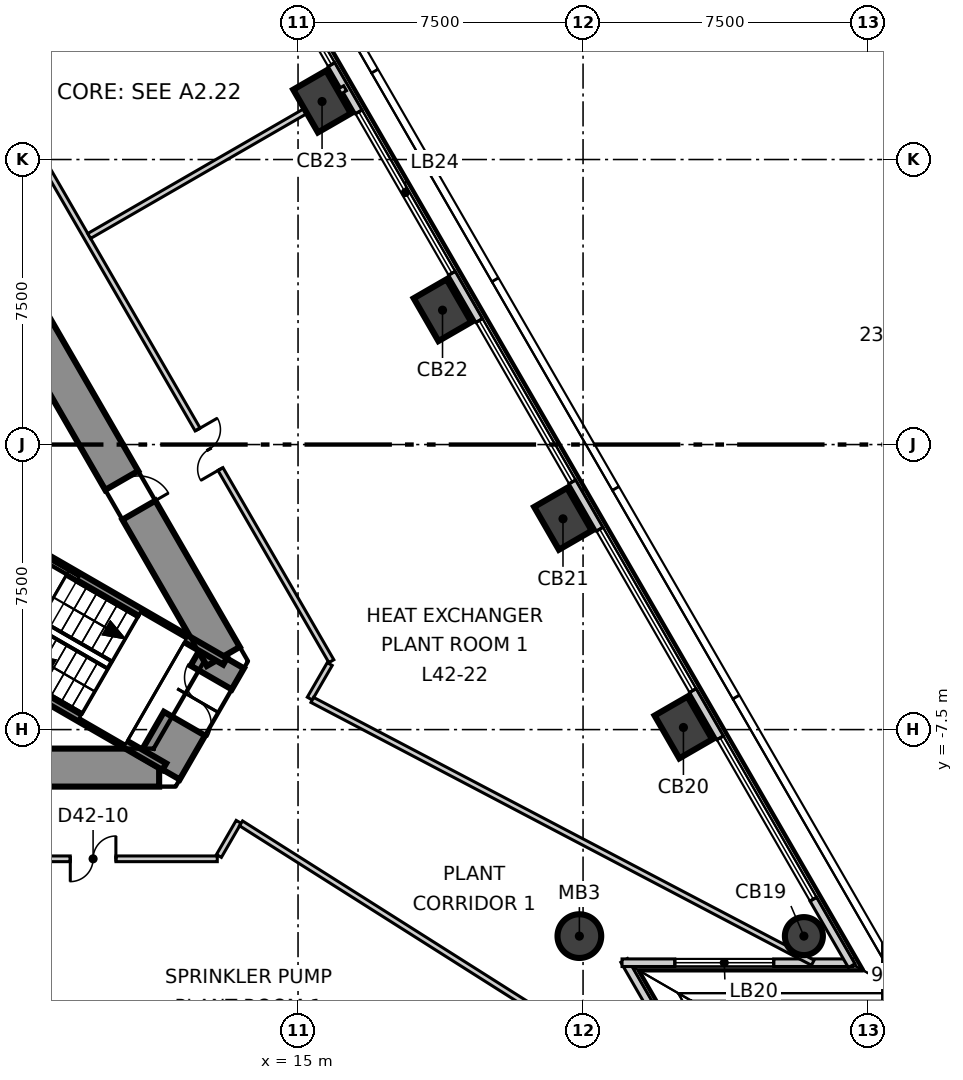
"""IFC4 building model, lengths in metres.
Left out: names, types, materials, properties, quantities, classifications, styles, units other than length and angle.
Written with IfcOpenShell. Run it as: python <this file> out.ifc"""

import sys

from ifc_helpers import new_model, si_unit, direction, frame, frame_2d, origin, origin_2d, place, context, subcontext, project, spatial, polyline, rectangle, circle, outline, extrude, element, fill, save


model = new_model("IFC4")
c1 = context("Model", 3, precision=1e-05, world=origin(), true_north=direction((0.0, 1.0)))
c2 = subcontext(c1, "Body", "Model", "MODEL_VIEW")
j1 = project(units=[si_unit("LENGTHUNIT", "METRE"), si_unit("PLANEANGLEUNIT", "RADIAN")], contexts=[c1])
p1 = place(None, origin())
s1 = spatial("IfcSite", under=j1, at=p1, CompositionType="ELEMENT")
p2 = place(p1, origin())
s2 = spatial("IfcBuilding", under=s1, at=p2, CompositionType="ELEMENT")
p3 = place(p2, frame((0.0, 0.0, 180.8)))
s3 = spatial("IfcBuildingStorey", under=s2, at=p3, CompositionType="ELEMENT", Elevation=180.8)
p4 = place(p3, frame((-11.345, -8.5, -0.6), z_axis=(0.0, 0.0, 1.0), x_axis=(1.0, 0.0, 0.0)))
e1 = element("IfcWall", 1, at=p4, inside=s3, PredefinedType="SHEAR", context=c2, shape_type="SweptSolid", body=[
    extrude(outline(polyline([(-0.433, -0.5), (1.53, -0.5), (3.493, -0.5), (5.456, -0.5), (7.419, -0.5), (9.382, -0.5), (11.345, -0.5), (13.308, -0.5), (15.271, -0.5), (17.234, -0.5), (19.197, -0.5), (21.16, -0.5), (23.123, -0.5), (22.257, 0.5), (20.273, 0.5), (18.289, 0.5), (16.305, 0.5), (14.321, 0.5), (12.337, 0.5), (10.353, 0.5), (8.369, 0.5), (6.385, 0.5), (4.401, 0.5), (2.417, 0.5), (0.433, 0.5), (-0.433, -0.5)])), origin(), (0.0, 0.0, 1.0), 4.5),
])
p5 = place(p4, frame((4.444, 0.0, 0.6)))
e2 = element("IfcOpeningElement", 2, at=p5, cuts=e1, PredefinedType="OPENING", context=c2, shape_type="SweptSolid", body=[
    extrude(rectangle(XDim=0.9, YDim=2.1, at=frame_2d((0.45, 1.05))), frame((0.0, 0.51, 0.0), z_axis=(0.0, -1.0, 0.0), x_axis=(1.0, 0.0, 0.0)), (0.0, 0.0, 1.0), 1.02),
])
p6 = place(p4, frame((17.584, 0.0, 0.6)))
e3 = element("IfcOpeningElement", 3, at=p6, cuts=e1, PredefinedType="OPENING", context=c2, shape_type="SweptSolid", body=[
    extrude(rectangle(XDim=1.0, YDim=2.1, at=frame_2d((0.5, 1.05))), frame((0.0, 0.51, 0.0), z_axis=(0.0, -1.0, 0.0), x_axis=(1.0, 0.0, 0.0)), (0.0, 0.0, 1.0), 1.02),
])
p7 = place(p3, frame((11.345, -8.5, -0.6), z_axis=(0.0, 0.0, 1.0), x_axis=(0.500041548022, 0.866001414694, 0.0)))
e4 = element("IfcWall", 4, at=p7, inside=s3, PredefinedType="SHEAR", context=c2, shape_type="SweptSolid", body=[
    extrude(outline(polyline([(-0.216, -0.625), (1.689, -0.625), (3.594, -0.625), (3.161, 0.625), (1.688, 0.625), (0.216, 0.625), (-0.216, -0.625)])), origin(), (0.0, 0.0, 1.0), 4.5),
])
p8 = place(p7, frame((1.336, 0.0, 0.6)))
e5 = element("IfcOpeningElement", 5, at=p8, cuts=e4, PredefinedType="OPENING", context=c2, shape_type="SweptSolid", body=[
    extrude(rectangle(XDim=1.4, YDim=2.1, at=frame_2d((0.7, 1.05))), frame((0.0, 0.635, 0.0), z_axis=(0.0, -1.0, 0.0), x_axis=(1.0, 0.0, 0.0)), (0.0, 0.0, 1.0), 1.27),
])
p9 = place(p3, frame((13.034, -5.575, -0.6), z_axis=(0.0, 0.0, 1.0), x_axis=(-0.500003116884, 0.866023604243, 0.0)))
e6 = element("IfcWall", 6, at=p9, inside=s3, PredefinedType="SHEAR", context=c2, shape_type="SweptSolid", body=[
    extrude(outline(polyline([(-0.433, -0.5), (1.53, -0.5), (3.493, -0.5), (5.456, -0.5), (7.419, -0.5), (9.382, -0.5), (11.345, -0.5), (13.308, -0.5), (15.271, -0.5), (17.234, -0.5), (19.197, -0.5), (21.16, -0.5), (23.123, -0.5), (22.257, 0.5), (20.273, 0.5), (18.289, 0.5), (16.305, 0.5), (14.321, 0.5), (12.337, 0.5), (10.353, 0.5), (8.369, 0.5), (6.385, 0.5), (4.401, 0.5), (2.417, 0.5), (0.433, 0.5), (-0.433, -0.5)])), origin(), (0.0, 0.0, 1.0), 4.5),
])
p10 = place(p9, frame((10.589, 0.0, 0.6)))
e7 = element("IfcOpeningElement", 7, at=p10, cuts=e6, PredefinedType="OPENING", context=c2, shape_type="SweptSolid", body=[
    extrude(rectangle(XDim=1.8, YDim=2.1, at=frame_2d((0.9, 1.05))), frame((0.0, 0.51, 0.0), z_axis=(0.0, -1.0, 0.0), x_axis=(1.0, 0.0, 0.0)), (0.0, 0.0, 1.0), 1.02),
])
p11 = place(p9, frame((17.634, 0.0, 0.6)))
e8 = element("IfcOpeningElement", 8, at=p11, cuts=e6, PredefinedType="OPENING", context=c2, shape_type="SweptSolid", body=[
    extrude(rectangle(XDim=0.9, YDim=2.1, at=frame_2d((0.45, 1.05))), frame((0.0, 0.51, 0.0), z_axis=(0.0, -1.0, 0.0), x_axis=(1.0, 0.0, 0.0)), (0.0, 0.0, 1.0), 1.02),
])
p12 = place(p9, frame((4.445, 0.0, 0.6)))
e9 = element("IfcOpeningElement", 9, at=p12, cuts=e6, PredefinedType="OPENING", context=c2, shape_type="SweptSolid", body=[
    extrude(rectangle(XDim=0.9, YDim=2.1, at=frame_2d((0.45, 1.05))), frame((0.0, 0.51, 0.0), z_axis=(0.0, -1.0, 0.0), x_axis=(1.0, 0.0, 0.0)), (0.0, 0.0, 1.0), 1.02),
])
p13 = place(p3, frame((28.311, -12.934, -0.6), z_axis=(0.0, 0.0, 1.0), x_axis=(-0.5, 0.866025403784, 0.0)))
e10 = element("IfcColumn", 10, at=p13, inside=s3, PredefinedType="COLUMN", context=c2, shape_type="SweptSolid", body=[
    extrude(circle(Radius=0.5, at=origin_2d()), origin(), (0.0, 0.0, 1.0), 4.5),
])
for number, where, z_axis, x_axis in (
    (11, (25.141, -7.444, -0.6), (0.0, 0.0, 1.0), (-0.5, 0.866, 0.0)),
    (12, (21.972, -1.954, -0.6), (0.0, 0.0, 1.0), (-0.5, 0.866, 0.0)),
    (13, (18.802, 3.536, -0.6), (0.0, 0.0, 1.0), (-0.5, 0.866, 0.0)),
    (14, (15.632, 9.026, -0.6), (0.0, 0.0, 1.0), (-0.5, 0.866, 0.0)),
):
    element("IfcColumn", number, at=place(p3, frame(where, z_axis=z_axis, x_axis=x_axis)), inside=s3, PredefinedType="COLUMN", context=c2, shape_type="SweptSolid", body=[
        extrude(rectangle(XDim=1.3, YDim=1.0, at=origin_2d()), origin(), (0.0, 0.0, 1.0), 4.5),
    ])
p14 = place(p3, frame((22.403, -12.934, -0.6), z_axis=(0.0, 0.0, 1.0), x_axis=(1.0, 0.0, 0.0)))
e15 = element("IfcColumn", 15, at=p14, inside=s3, PredefinedType="COLUMN", context=c2, shape_type="SweptSolid", body=[
    extrude(circle(Radius=0.575, at=origin_2d()), origin(), (0.0, 0.0, 1.0), 4.5),
])
p15 = place(p3, frame((26.615, -18.829, 0.0), z_axis=(0.0, 0.0, 1.0), x_axis=(-0.499916304465, 0.866073720032, 0.0)))
e16 = element("IfcWall", 16, at=p15, inside=s3, PredefinedType="ELEMENTEDWALL", context=c2, shape_type="SweptSolid", body=[
    extrude(rectangle(XDim=6.069, YDim=0.2, at=frame_2d((3.034, 0.0))), origin(), (0.0, 0.0, 1.0), 3.9),
])
p16 = place(p15, frame((1.99, 0.0, 0.6)))
e17 = element("IfcOpeningElement", 17, at=p16, cuts=e16, PredefinedType="OPENING", context=c2, shape_type="SweptSolid", body=[
    extrude(rectangle(XDim=2.6, YDim=3.0, at=frame_2d((1.3, 1.5))), frame((0.0, 0.11, 0.0), z_axis=(0.0, -1.0, 0.0), x_axis=(1.0, 0.0, 0.0)), (0.0, 0.0, 1.0), 0.22),
])
p17 = place(p3, frame((23.526, -13.634, 0.0), z_axis=(0.0, 0.0, 1.0), x_axis=(1.0, 0.0, 0.0)))
e18 = element("IfcWall", 18, at=p17, inside=s3, PredefinedType="ELEMENTEDWALL", context=c2, shape_type="SweptSolid", body=[
    extrude(rectangle(XDim=6.068, YDim=0.2, at=frame_2d((3.034, 0.0))), origin(), (0.0, 0.0, 1.0), 3.9),
])
p18 = place(p17, frame((1.39, 0.0, 0.6)))
e19 = element("IfcOpeningElement", 19, at=p18, cuts=e18, PredefinedType="OPENING", context=c2, shape_type="SweptSolid", body=[
    extrude(rectangle(XDim=2.6, YDim=3.0, at=frame_2d((1.3, 1.5))), frame((0.0, 0.11, 0.0), z_axis=(0.0, -1.0, 0.0), x_axis=(1.0, 0.0, 0.0)), (0.0, 0.0, 1.0), 0.22),
])
p19 = place(p3, frame((29.569, -13.712, 0.0), z_axis=(0.0, 0.0, 1.0), x_axis=(-0.500011769953, 0.866018608292, 0.0)))
e20 = element("IfcWall", 20, at=p19, inside=s3, PredefinedType="ELEMENTEDWALL", context=c2, shape_type="SweptSolid", body=[
    extrude(rectangle(XDim=53.299, YDim=0.2, at=frame_2d((26.649, 0.0))), origin(), (0.0, 0.0, 1.0), 3.9),
])
p20 = place(p19, frame((2.022, 0.0, 0.6)))
e21 = element("IfcOpeningElement", 21, at=p20, cuts=e20, PredefinedType="OPENING", context=c2, shape_type="SweptSolid", body=[
    extrude(rectangle(XDim=4.9, YDim=3.0, at=frame_2d((2.45, 1.5))), frame((0.0, 0.11, 0.0), z_axis=(0.0, -1.0, 0.0), x_axis=(1.0, 0.0, 0.0)), (0.0, 0.0, 1.0), 0.22),
])
p21 = place(p19, frame((8.361, 0.0, 0.6)))
e22 = element("IfcOpeningElement", 22, at=p21, cuts=e20, PredefinedType="OPENING", context=c2, shape_type="SweptSolid", body=[
    extrude(rectangle(XDim=4.9, YDim=3.0, at=frame_2d((2.45, 1.5))), frame((0.0, 0.11, 0.0), z_axis=(0.0, -1.0, 0.0), x_axis=(1.0, 0.0, 0.0)), (0.0, 0.0, 1.0), 0.22),
])
p22 = place(p19, frame((14.701, 0.0, 0.6)))
e23 = element("IfcOpeningElement", 23, at=p22, cuts=e20, PredefinedType="OPENING", context=c2, shape_type="SweptSolid", body=[
    extrude(rectangle(XDim=4.9, YDim=3.0, at=frame_2d((2.45, 1.5))), frame((0.0, 0.11, 0.0), z_axis=(0.0, -1.0, 0.0), x_axis=(1.0, 0.0, 0.0)), (0.0, 0.0, 1.0), 0.22),
])
p23 = place(p19, frame((21.04, 0.0, 0.6)))
e24 = element("IfcOpeningElement", 24, at=p23, cuts=e20, PredefinedType="OPENING", context=c2, shape_type="SweptSolid", body=[
    extrude(rectangle(XDim=4.9, YDim=3.0, at=frame_2d((2.45, 1.5))), frame((0.0, 0.11, 0.0), z_axis=(0.0, -1.0, 0.0), x_axis=(1.0, 0.0, 0.0)), (0.0, 0.0, 1.0), 0.22),
])
p24 = place(p19, frame((27.379, 0.0, 0.6)))
e25 = element("IfcOpeningElement", 25, at=p24, cuts=e20, PredefinedType="OPENING", context=c2, shape_type="SweptSolid", body=[
    extrude(rectangle(XDim=4.9, YDim=3.0, at=frame_2d((2.45, 1.5))), frame((0.0, 0.11, 0.0), z_axis=(0.0, -1.0, 0.0), x_axis=(1.0, 0.0, 0.0)), (0.0, 0.0, 1.0), 0.22),
])
p25 = place(p19, frame((33.718, 0.0, 0.6)))
e26 = element("IfcOpeningElement", 26, at=p25, cuts=e20, PredefinedType="OPENING", context=c2, shape_type="SweptSolid", body=[
    extrude(rectangle(XDim=4.9, YDim=3.0, at=frame_2d((2.45, 1.5))), frame((0.0, 0.11, 0.0), z_axis=(0.0, -1.0, 0.0), x_axis=(1.0, 0.0, 0.0)), (0.0, 0.0, 1.0), 0.22),
])
p26 = place(p19, frame((40.057, 0.0, 0.6)))
e27 = element("IfcOpeningElement", 27, at=p26, cuts=e20, PredefinedType="OPENING", context=c2, shape_type="SweptSolid", body=[
    extrude(rectangle(XDim=4.9, YDim=3.0, at=frame_2d((2.45, 1.5))), frame((0.0, 0.11, 0.0), z_axis=(0.0, -1.0, 0.0), x_axis=(1.0, 0.0, 0.0)), (0.0, 0.0, 1.0), 0.22),
])
p27 = place(p19, frame((46.397, 0.0, 0.6)))
e28 = element("IfcOpeningElement", 28, at=p27, cuts=e20, PredefinedType="OPENING", context=c2, shape_type="SweptSolid", body=[
    extrude(rectangle(XDim=4.9, YDim=3.0, at=frame_2d((2.45, 1.5))), frame((0.0, 0.11, 0.0), z_axis=(0.0, -1.0, 0.0), x_axis=(1.0, 0.0, 0.0)), (0.0, 0.0, 1.0), 0.22),
])
p28 = place(p3, frame((-12.788, -10.9, 0.0), z_axis=(0.0, 0.0, 1.0), x_axis=(1.0, 0.0, 0.0)))
e29 = element("IfcWall", 29, at=p28, inside=s3, PredefinedType="PARTITIONING", context=c2, shape_type="SweptSolid", body=[
    extrude(rectangle(XDim=25.663, YDim=0.15, at=frame_2d((12.832, 0.0))), origin(), (0.0, 0.0, 1.0), 3.9),
])
p29 = place(p28, frame((2.581, 0.0, 0.0)))
e30 = element("IfcOpeningElement", 30, at=p29, cuts=e29, PredefinedType="OPENING", context=c2, shape_type="SweptSolid", body=[
    extrude(rectangle(XDim=1.2, YDim=2.1, at=frame_2d((0.6, 1.05))), frame((0.0, 0.085, 0.0), z_axis=(0.0, -1.0, 0.0), x_axis=(1.0, 0.0, 0.0)), (0.0, 0.0, 1.0), 0.17),
])
p30 = place(p28, frame((9.118, 0.0, 0.0)))
e31 = element("IfcOpeningElement", 31, at=p30, cuts=e29, PredefinedType="OPENING", context=c2, shape_type="SweptSolid", body=[
    extrude(rectangle(XDim=1.0, YDim=2.1, at=frame_2d((0.5, 1.05))), frame((0.0, 0.085, 0.0), z_axis=(0.0, -1.0, 0.0), x_axis=(1.0, 0.0, 0.0)), (0.0, 0.0, 1.0), 0.17),
])
p31 = place(p28, frame((15.457, 0.0, 0.0)))
e32 = element("IfcOpeningElement", 32, at=p31, cuts=e29, PredefinedType="OPENING", context=c2, shape_type="SweptSolid", body=[
    extrude(rectangle(XDim=1.0, YDim=2.1, at=frame_2d((0.5, 1.05))), frame((0.0, 0.085, 0.0), z_axis=(0.0, -1.0, 0.0), x_axis=(1.0, 0.0, 0.0)), (0.0, 0.0, 1.0), 0.17),
])
p32 = place(p28, frame((21.795, 0.0, 0.0)))
e33 = element("IfcOpeningElement", 33, at=p32, cuts=e29, PredefinedType="OPENING", context=c2, shape_type="SweptSolid", body=[
    extrude(rectangle(XDim=1.2, YDim=2.1, at=frame_2d((0.6, 1.05))), frame((0.0, 0.085, 0.0), z_axis=(0.0, -1.0, 0.0), x_axis=(1.0, 0.0, 0.0)), (0.0, 0.0, 1.0), 0.17),
])
p33 = place(p3, frame((3.046, 16.525, 0.0), z_axis=(0.0, 0.0, 1.0), x_axis=(0.499986250302, -0.866033342031, 0.0)))
e34 = element("IfcWall", 34, at=p33, inside=s3, PredefinedType="PARTITIONING", context=c2, shape_type="SweptSolid", body=[
    extrude(rectangle(XDim=25.663, YDim=0.15, at=frame_2d((12.832, 0.0))), origin(), (0.0, 0.0, 1.0), 3.9),
])
p34 = place(p33, frame((18.625, 0.0, 0.0)))
e35 = element("IfcOpeningElement", 35, at=p34, cuts=e34, PredefinedType="OPENING", context=c2, shape_type="SweptSolid", body=[
    extrude(rectangle(XDim=1.2, YDim=2.1, at=frame_2d((0.6, 1.05))), frame((0.0, 0.085, 0.0), z_axis=(0.0, -1.0, 0.0), x_axis=(1.0, 0.0, 0.0)), (0.0, 0.0, 1.0), 0.17),
])
p35 = place(p33, frame((5.75, 0.0, 0.0)))
e36 = element("IfcOpeningElement", 36, at=p35, cuts=e34, PredefinedType="OPENING", context=c2, shape_type="SweptSolid", body=[
    extrude(rectangle(XDim=1.2, YDim=2.1, at=frame_2d((0.6, 1.05))), frame((0.0, 0.085, 0.0), z_axis=(0.0, -1.0, 0.0), x_axis=(1.0, 0.0, 0.0)), (0.0, 0.0, 1.0), 0.17),
])
p36 = place(p3, frame((12.918, -10.825, 0.0), z_axis=(0.0, 0.0, 1.0), x_axis=(0.500442301859, 0.865769890046, 0.0)))
e37 = element("IfcWall", 37, at=p36, inside=s3, PredefinedType="PARTITIONING", context=c2, shape_type="SweptSolid", body=[
    extrude(rectangle(XDim=1.037, YDim=0.15, at=frame_2d((0.519, 0.0))), origin(), (0.0, 0.0, 1.0), 3.9),
])
p37 = place(p3, frame((15.309, -6.684, 0.0), z_axis=(0.0, 0.0, 1.0), x_axis=(0.499990860175, 0.866030680601, 0.0)))
e38 = element("IfcWall", 38, at=p37, inside=s3, PredefinedType="PARTITIONING", context=c2, shape_type="SweptSolid", body=[
    extrude(rectangle(XDim=1.05, YDim=0.15, at=frame_2d((0.525, 0.0))), origin(), (0.0, 0.0, 1.0), 3.9),
])
p38 = place(p3, frame((13.5, -9.967, 0.0), z_axis=(0.0, 0.0, 1.0), x_axis=(0.844863939608, -0.534981236634, 0.0)))
e39 = element("IfcWall", 39, at=p38, inside=s3, PredefinedType="PARTITIONING", context=c2, shape_type="SweptSolid", body=[
    extrude(rectangle(XDim=14.922, YDim=0.15, at=frame_2d((7.461, 0.0))), origin(), (0.0, 0.0, 1.0), 3.2),
])
p39 = place(p3, frame((9.504, 5.488, 0.0), z_axis=(0.0, 0.0, 1.0), x_axis=(0.8660261172, 0.499998764326, 0.0)))
e40 = element("IfcWall", 40, at=p39, inside=s3, PredefinedType="PARTITIONING", context=c2, shape_type="SweptSolid", body=[
    extrude(rectangle(XDim=7.776, YDim=0.15, at=frame_2d((3.888, 0.0))), origin(), (0.0, 0.0, 1.0), 3.4),
])
p40 = place(p3, frame((15.375, -6.719, 0.0), z_axis=(0.0, 0.0, 1.0), x_axis=(0.885374935021, -0.464877644586, 0.0)))
e41 = element("IfcWall", 41, at=p40, inside=s3, PredefinedType="PARTITIONING", context=c2, shape_type="SweptSolid", body=[
    extrude(rectangle(XDim=14.875, YDim=0.15, at=frame_2d((7.438, 0.0))), origin(), (0.0, 0.0, 1.0), 3.2),
])
p41 = place(p3, frame((6.529, -1.922, 0.0), z_axis=(0.0, 0.0, 1.0), x_axis=(0.866039934834, -0.499974830638, 0.0)))
e42 = element("IfcWall", 42, at=p41, inside=s3, PredefinedType="SOLIDWALL", context=c2, shape_type="SweptSolid", body=[
    extrude(rectangle(XDim=7.564, YDim=0.2, at=frame_2d((3.782, 0.0))), origin(), (0.0, 0.0, 1.0), 3.9),
])
p42 = place(p3, frame((4.929, -4.693, 0.0), z_axis=(0.0, 0.0, 1.0), x_axis=(0.865984032653, -0.500071650056, 0.0)))
e43 = element("IfcWall", 43, at=p42, inside=s3, PredefinedType="SOLIDWALL", context=c2, shape_type="SweptSolid", body=[
    extrude(rectangle(XDim=7.565, YDim=0.2, at=frame_2d((3.782, 0.0))), origin(), (0.0, 0.0, 1.0), 3.9),
])
p43 = place(p18, origin())
e44 = element("IfcWindow", 44, at=p43, inside=s3, PartitioningType="SINGLE_PANEL", PredefinedType="WINDOW", context=c2, shape_type="SweptSolid", body=[
    extrude(rectangle(XDim=2.6, YDim=3.0, at=frame_2d((1.3, 1.5))), frame((0.0, 0.03, 0.0), z_axis=(0.0, -1.0, 0.0), x_axis=(1.0, 0.0, 0.0)), (0.0, 0.0, 1.0), 0.06),
])
fill(e19, e44)
p44 = place(p20, origin())
e45 = element("IfcWindow", 45, at=p44, inside=s3, PartitioningType="SINGLE_PANEL", PredefinedType="WINDOW", context=c2, shape_type="SweptSolid", body=[
    extrude(rectangle(XDim=4.9, YDim=3.0, at=frame_2d((2.45, 1.5))), frame((0.0, 0.03, 0.0), z_axis=(0.0, -1.0, 0.0), x_axis=(1.0, 0.0, 0.0)), (0.0, 0.0, 1.0), 0.06),
])
fill(e21, e45)
p45 = place(p21, origin())
e46 = element("IfcWindow", 46, at=p45, inside=s3, PartitioningType="SINGLE_PANEL", PredefinedType="WINDOW", context=c2, shape_type="SweptSolid", body=[
    extrude(rectangle(XDim=4.9, YDim=3.0, at=frame_2d((2.45, 1.5))), frame((0.0, 0.03, 0.0), z_axis=(0.0, -1.0, 0.0), x_axis=(1.0, 0.0, 0.0)), (0.0, 0.0, 1.0), 0.06),
])
fill(e22, e46)
p46 = place(p22, origin())
e47 = element("IfcWindow", 47, at=p46, inside=s3, PartitioningType="SINGLE_PANEL", PredefinedType="WINDOW", context=c2, shape_type="SweptSolid", body=[
    extrude(rectangle(XDim=4.9, YDim=3.0, at=frame_2d((2.45, 1.5))), frame((0.0, 0.03, 0.0), z_axis=(0.0, -1.0, 0.0), x_axis=(1.0, 0.0, 0.0)), (0.0, 0.0, 1.0), 0.06),
])
fill(e23, e47)
p47 = place(p23, origin())
e48 = element("IfcWindow", 48, at=p47, inside=s3, PartitioningType="SINGLE_PANEL", PredefinedType="WINDOW", context=c2, shape_type="SweptSolid", body=[
    extrude(rectangle(XDim=4.9, YDim=3.0, at=frame_2d((2.45, 1.5))), frame((0.0, 0.03, 0.0), z_axis=(0.0, -1.0, 0.0), x_axis=(1.0, 0.0, 0.0)), (0.0, 0.0, 1.0), 0.06),
])
fill(e24, e48)
p48 = place(p24, origin())
e49 = element("IfcWindow", 49, at=p48, inside=s3, PartitioningType="SINGLE_PANEL", PredefinedType="WINDOW", context=c2, shape_type="SweptSolid", body=[
    extrude(rectangle(XDim=4.9, YDim=3.0, at=frame_2d((2.45, 1.5))), frame((0.0, 0.03, 0.0), z_axis=(0.0, -1.0, 0.0), x_axis=(1.0, 0.0, 0.0)), (0.0, 0.0, 1.0), 0.06),
])
fill(e25, e49)
p49 = place(p34, origin())
e50 = element("IfcDoor", 50, at=p49, inside=s3, OperationType="DOUBLE_DOOR_SINGLE_SWING", PredefinedType="DOOR", context=c2, shape_type="SweptSolid", body=[
    extrude(rectangle(XDim=1.2, YDim=2.1, at=frame_2d((0.6, 1.05))), frame((0.0, 0.025, 0.0), z_axis=(0.0, -1.0, 0.0), x_axis=(1.0, 0.0, 0.0)), (0.0, 0.0, 1.0), 0.05),
])
fill(e35, e50)
p50 = place(p32, origin())
e51 = element("IfcDoor", 51, at=p50, inside=s3, OperationType="DOUBLE_DOOR_SINGLE_SWING", PredefinedType="DOOR", context=c2, shape_type="SweptSolid", body=[
    extrude(rectangle(XDim=1.2, YDim=2.1, at=frame_2d((0.6, 1.05))), frame((0.0, 0.025, 0.0), z_axis=(0.0, -1.0, 0.0), x_axis=(1.0, 0.0, 0.0)), (0.0, 0.0, 1.0), 0.05),
])
fill(e33, e51)
p51 = place(p8, origin())
e52 = element("IfcDoor", 52, at=p51, inside=s3, OperationType="DOUBLE_DOOR_SINGLE_SWING", PredefinedType="DOOR", context=c2, shape_type="SweptSolid", body=[
    extrude(rectangle(XDim=1.4, YDim=2.1, at=frame_2d((0.7, 1.05))), frame((0.0, 0.025, 0.0), z_axis=(0.0, -1.0, 0.0), x_axis=(1.0, 0.0, 0.0)), (0.0, 0.0, 1.0), 0.05),
])
fill(e5, e52)
p52 = place(p12, origin())
e53 = element("IfcDoor", 53, at=p52, inside=s3, OperationType="SINGLE_SWING_LEFT", PredefinedType="DOOR", context=c2, shape_type="SweptSolid", body=[
    extrude(rectangle(XDim=0.9, YDim=2.1, at=frame_2d((0.45, 1.05))), frame((0.0, 0.025, 0.0), z_axis=(0.0, -1.0, 0.0), x_axis=(1.0, 0.0, 0.0)), (0.0, 0.0, 1.0), 0.05),
])
fill(e9, e53)
save(model, sys.argv[1])
